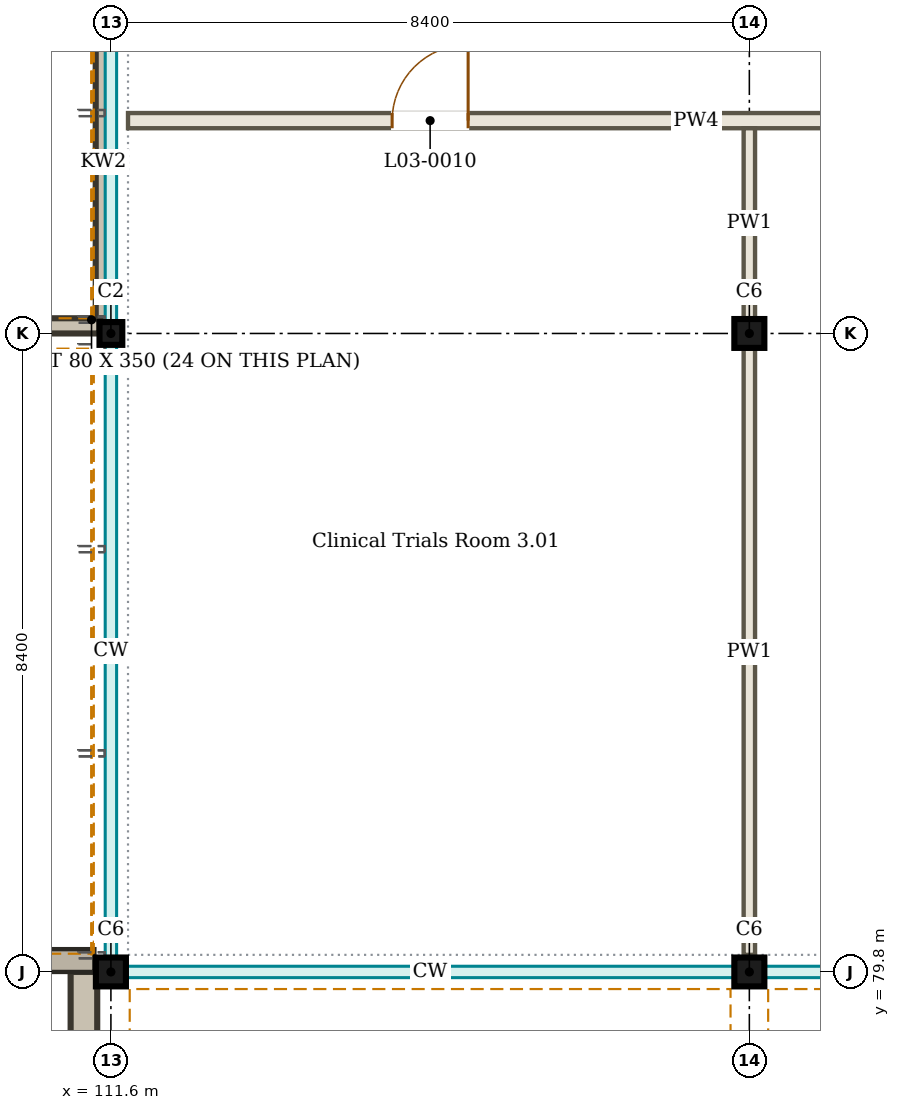
"""IFC4 building model, lengths in metres.
Left out: names, types, materials, properties, quantities, classifications, styles, units other than length and angle.
Written with IfcOpenShell. Run it as: python <this file> out.ifc"""

import sys

from ifc_helpers import new_model, si_unit, direction, frame, frame_2d, origin, origin_2d, place, context, subcontext, project, spatial, rectangle, i_section, extrude, element, fill, save


model = new_model("IFC4")
c1 = context("Model", 3, precision=1e-05, world=origin(), true_north=direction((0.0, 1.0)))
c2 = subcontext(c1, "Body", "Model", "MODEL_VIEW")
j1 = project(units=[si_unit("LENGTHUNIT", "METRE"), si_unit("PLANEANGLEUNIT", "RADIAN")], contexts=[c1])
p1 = place(None, origin())
s1 = spatial("IfcSite", under=j1, at=p1, CompositionType="ELEMENT")
p2 = place(p1, origin())
s2 = spatial("IfcBuilding", under=s1, at=p2, CompositionType="ELEMENT")
p3 = place(p2, frame((0.0, 0.0, 13.5)))
s3 = spatial("IfcBuildingStorey", under=s2, at=p3, CompositionType="ELEMENT", Elevation=13.5)
for number, where, z_axis, x_axis in (
    (1, (111.6, 79.8, 0.0), (0.0, 0.0, 1.0), (1.0, 0.0, 0.0)),
    (2, (120.0, 79.8, 0.0), (0.0, 0.0, 1.0), (1.0, 0.0, 0.0)),
):
    element("IfcColumn", number, at=place(p3, frame(where, z_axis=z_axis, x_axis=x_axis)), inside=s3, PredefinedType="COLUMN", context=c2, shape_type="SweptSolid", body=[
        extrude(i_section(OverallWidth=0.395, OverallDepth=0.38, WebThickness=0.019, FlangeThickness=0.03, FilletRadius=0.027, at=origin_2d()), origin(), (0.0, 0.0, 1.0), 4.5),
    ])
p4 = place(p3, frame((111.6, 88.2, 0.0), z_axis=(0.0, 0.0, 1.0), x_axis=(1.0, 0.0, 0.0)))
e3 = element("IfcColumn", 3, at=p4, inside=s3, PredefinedType="COLUMN", context=c2, shape_type="SweptSolid", body=[
    extrude(i_section(OverallWidth=0.3, OverallDepth=0.3, WebThickness=0.011, FlangeThickness=0.019, FilletRadius=0.027, at=origin_2d()), origin(), (0.0, 0.0, 1.0), 4.5),
])
p5 = place(p3, frame((120.0, 88.2, 0.0), z_axis=(0.0, 0.0, 1.0), x_axis=(1.0, 0.0, 0.0)))
e4 = element("IfcColumn", 4, at=p5, inside=s3, PredefinedType="COLUMN", context=c2, shape_type="SweptSolid", body=[
    extrude(i_section(OverallWidth=0.395, OverallDepth=0.38, WebThickness=0.019, FlangeThickness=0.03, FilletRadius=0.027, at=origin_2d()), origin(), (0.0, 0.0, 1.0), 4.5),
])
for number, where, z_axis, x_axis in (
    (5, (111.798, 79.64, 3.87), (0.0, 0.0, 1.0), (1.0, 0.0, 0.0)),
    (6, (120.198, 79.64, 3.87), (0.0, 0.0, 1.0), (1.0, 0.0, 0.0)),
):
    element("IfcWall", number, at=place(p3, frame(where, z_axis=z_axis, x_axis=x_axis)), inside=s3, PredefinedType="SOLIDWALL", context=c2, shape_type="SweptSolid", body=[
        extrude(rectangle(XDim=8.005, YDim=0.13, at=frame_2d((4.002, 0.0))), origin(), (0.0, 0.0, 1.0), 0.63),
    ])
p6 = place(p3, frame((111.44, 79.99, 3.87), z_axis=(0.0, 0.0, 1.0), x_axis=(0.0, 1.0, 0.0)))
e7 = element("IfcWall", 7, at=p6, inside=s3, PredefinedType="SOLIDWALL", context=c2, shape_type="SweptSolid", body=[
    extrude(rectangle(XDim=8.06, YDim=0.13, at=frame_2d((4.03, 0.0))), origin(), (0.0, 0.0, 1.0), 0.63),
])
p7 = place(p3, frame((111.44, 88.35, 3.87), z_axis=(0.0, 0.0, 1.0), x_axis=(0.0, 1.0, 0.0)))
e8 = element("IfcWall", 8, at=p7, inside=s3, PredefinedType="SOLIDWALL", context=c2, shape_type="SweptSolid", body=[
    extrude(rectangle(XDim=8.25, YDim=0.13, at=frame_2d((4.125, 0.0))), origin(), (0.0, 0.0, 1.0), 0.63),
])
p8 = place(p3, frame((103.2, 79.95, 0.0), z_axis=(0.0, 0.0, 1.0), x_axis=(1.0, 0.0, 0.0)))
e9 = element("IfcWall", 9, at=p8, inside=s3, PredefinedType="PARAPET", context=c2, shape_type="SweptSolid", body=[
    extrude(rectangle(XDim=8.183, YDim=0.3, at=frame_2d((4.091, 0.0))), origin(), (0.0, 0.0, 1.0), 1.0),
])
p9 = place(p3, frame((111.825, 91.0, 0.0), z_axis=(0.0, 0.0, 1.0), x_axis=(1.0, 0.0, 0.0)))
e10 = element("IfcWall", 10, at=p9, inside=s3, PredefinedType="PARTITIONING", context=c2, shape_type="SweptSolid", body=[
    extrude(rectangle(XDim=22.275, YDim=0.2, at=frame_2d((11.138, 0.0))), origin(), (0.0, 0.0, 1.0), 3.8),
])
p10 = place(p9, frame((3.475, 0.0, 0.0)))
e11 = element("IfcOpeningElement", 11, at=p10, cuts=e10, PredefinedType="OPENING", context=c2, shape_type="SweptSolid", body=[
    extrude(rectangle(XDim=1.0, YDim=2.1, at=frame_2d((0.5, 1.05))), frame((0.0, 0.11, 0.0), z_axis=(0.0, -1.0, 0.0), x_axis=(1.0, 0.0, 0.0)), (0.0, 0.0, 1.0), 0.22),
])
p11 = place(p9, frame((10.475, 0.0, 0.0)))
e12 = element("IfcOpeningElement", 12, at=p11, cuts=e10, PredefinedType="OPENING", context=c2, shape_type="SweptSolid", body=[
    extrude(rectangle(XDim=1.0, YDim=2.1, at=frame_2d((0.5, 1.05))), frame((0.0, 0.11, 0.0), z_axis=(0.0, -1.0, 0.0), x_axis=(1.0, 0.0, 0.0)), (0.0, 0.0, 1.0), 0.22),
])
p12 = place(p9, frame((16.075, 0.0, 0.0)))
e13 = element("IfcOpeningElement", 13, at=p12, cuts=e10, PredefinedType="OPENING", context=c2, shape_type="SweptSolid", body=[
    extrude(rectangle(XDim=1.0, YDim=2.1, at=frame_2d((0.5, 1.05))), frame((0.0, 0.11, 0.0), z_axis=(0.0, -1.0, 0.0), x_axis=(1.0, 0.0, 0.0)), (0.0, 0.0, 1.0), 0.22),
])
p13 = place(p3, frame((120.0, 80.025, 0.0), z_axis=(0.0, 0.0, 1.0), x_axis=(0.0, 1.0, 0.0)))
e14 = element("IfcWall", 14, at=p13, inside=s3, PredefinedType="PARTITIONING", context=c2, shape_type="SweptSolid", body=[
    extrude(rectangle(XDim=7.978, YDim=0.15, at=frame_2d((3.989, 0.0))), origin(), (0.0, 0.0, 1.0), 3.8),
])
p14 = place(p3, frame((120.0, 88.397, 0.0), z_axis=(0.0, 0.0, 1.0), x_axis=(0.0, 1.0, 0.0)))
e15 = element("IfcWall", 15, at=p14, inside=s3, PredefinedType="PARTITIONING", context=c2, shape_type="SweptSolid", body=[
    extrude(rectangle(XDim=2.502, YDim=0.15, at=frame_2d((1.251, 0.0))), origin(), (0.0, 0.0, 1.0), 3.8),
])
p15 = place(p3, frame((111.45, 88.3, 0.0), z_axis=(0.0, 0.0, 1.0), x_axis=(-1.0, 0.0, 0.0)))
e16 = element("IfcWall", 16, at=p15, inside=s3, PredefinedType="SOLIDWALL", context=c2, shape_type="SweptSolid", body=[
    extrude(rectangle(XDim=4.45, YDim=0.2, at=frame_2d((2.225, 0.0))), origin(), (0.0, 0.0, 1.0), 3.0),
])
p16 = place(p3, frame((111.5, 88.4, 0.0), z_axis=(0.0, 0.0, 1.0), x_axis=(0.0, 1.0, 0.0)))
e17 = element("IfcWall", 17, at=p16, inside=s3, PredefinedType="SOLIDWALL", context=c2, shape_type="SweptSolid", body=[
    extrude(rectangle(XDim=8.2, YDim=0.2, at=frame_2d((4.1, 0.0))), origin(), (0.0, 0.0, 1.0), 3.0),
])
p17 = place(p10, origin())
e18 = element("IfcDoor", 18, at=p17, inside=s3, OperationType="SINGLE_SWING_RIGHT", PredefinedType="DOOR", context=c2, shape_type="SweptSolid", body=[
    extrude(rectangle(XDim=1.0, YDim=2.1, at=frame_2d((0.5, 1.05))), frame((0.0, 0.025, 0.0), z_axis=(0.0, -1.0, 0.0), x_axis=(1.0, 0.0, 0.0)), (0.0, 0.0, 1.0), 0.05),
])
fill(e11, e18)
save(model, sys.argv[1])
